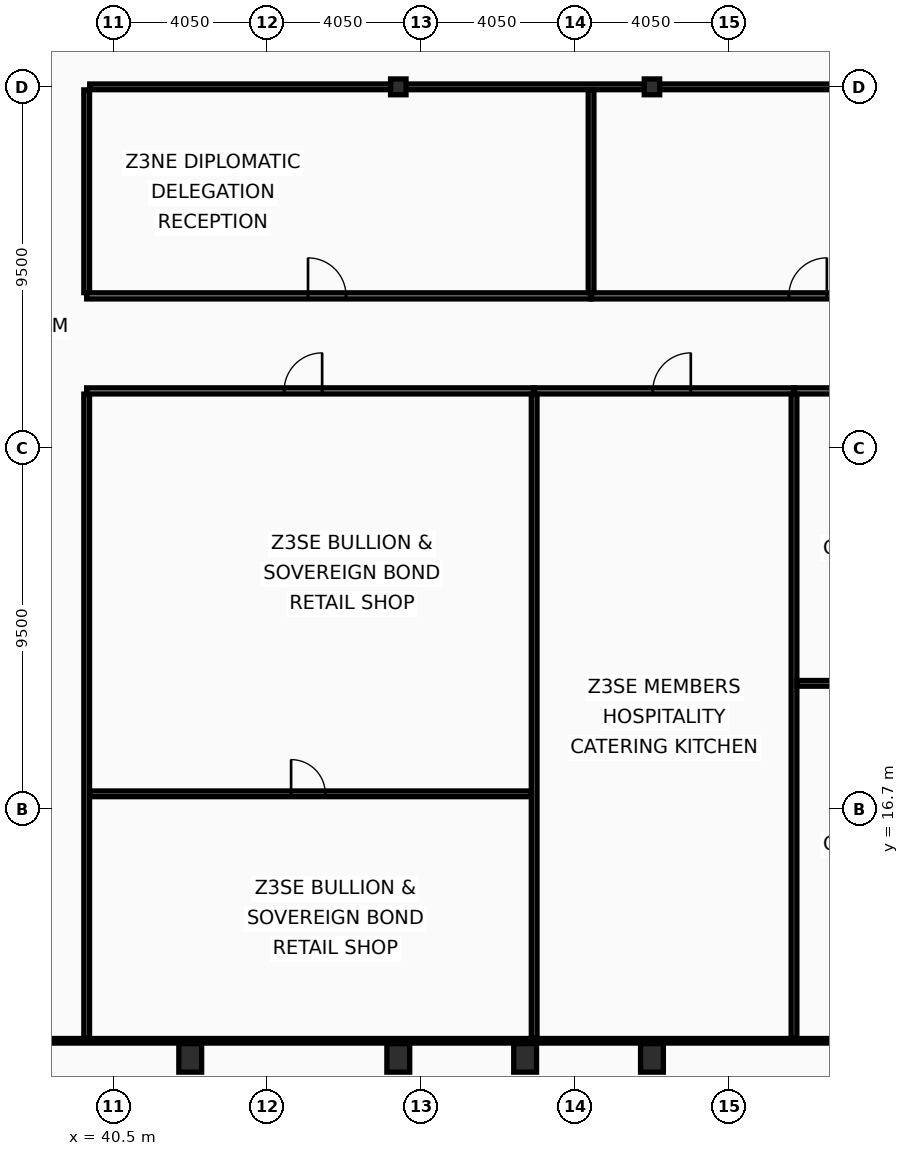
"""IFC4 building model, lengths in metres.
Left out: names, types, materials, properties, quantities, classifications, styles, units other than length and angle.
Written with IfcOpenShell. Run it as: python <this file> out.ifc"""

import sys

from ifc_helpers import new_model, si_unit, direction, frame, frame_2d, origin, origin_2d, place, context, subcontext, project, spatial, rectangle, hollow_rectangle, i_section, extrude, element, fill, save


model = new_model("IFC4")
c1 = context("Model", 3, precision=1e-05, world=origin(), true_north=direction((0.0, 1.0)))
c2 = subcontext(c1, "Body", "Model", "MODEL_VIEW")
j1 = project(units=[si_unit("LENGTHUNIT", "METRE"), si_unit("PLANEANGLEUNIT", "RADIAN")], contexts=[c1])
p1 = place(None, origin())
s1 = spatial("IfcSite", under=j1, at=p1, CompositionType="ELEMENT")
p2 = place(p1, origin())
s2 = spatial("IfcBuilding", under=s1, at=p2, CompositionType="ELEMENT")
p3 = place(p2, frame((0.0, 0.0, 210.2)))
s3 = spatial("IfcBuildingStorey", under=s2, at=p3, CompositionType="ELEMENT", Elevation=210.2)
for number, where, z_axis, x_axis in (
    (1, (42.525, 10.15, 0.0), (0.0, 0.0, 1.0), (1.0, 0.0, 0.0)),
    (2, (48.0, 10.15, 0.0), (0.0, 0.0, 1.0), (1.0, 0.0, 0.0)),
    (3, (51.337, 10.15, 0.0), (0.0, 0.0, 1.0), (1.0, 0.0, 0.0)),
    (4, (54.675, 10.15, 0.0), (0.0, 0.0, 1.0), (1.0, 0.0, 0.0)),
):
    element("IfcColumn", number, at=place(p3, frame(where, z_axis=z_axis, x_axis=x_axis)), inside=s3, PredefinedType="COLUMN", context=c2, shape_type="SweptSolid", body=[
        extrude(hollow_rectangle(XDim=0.6, YDim=0.75, WallThickness=0.045, at=origin_2d()), origin(), (0.0, 0.0, 1.0), 3.6),
    ])
for number, where, z_axis, x_axis in (
    (5, (48.0, 35.7, 0.0), (0.0, 0.0, 1.0), (1.0, 0.0, 0.0)),
    (6, (54.675, 35.7, 0.0), (0.0, 0.0, 1.0), (1.0, 0.0, 0.0)),
):
    element("IfcColumn", number, at=place(p3, frame(where, z_axis=z_axis, x_axis=x_axis)), inside=s3, PredefinedType="COLUMN", context=c2, shape_type="SweptSolid", body=[
        extrude(i_section(OverallWidth=0.406, OverallDepth=0.416, WebThickness=0.03, FlangeThickness=0.048, at=origin_2d()), origin(), (0.0, 0.0, 1.0), 3.6),
    ])
p4 = place(p3, frame((39.8, 10.665, 0.0), z_axis=(0.0, 0.0, 1.0), x_axis=(0.0, 1.0, 0.0)))
e7 = element("IfcWall", 7, at=p4, inside=s3, PredefinedType="PARTITIONING", context=c2, shape_type="SweptSolid", body=[
    extrude(rectangle(XDim=16.95, YDim=0.15, at=frame_2d((8.475, 0.0))), origin(), (0.0, 0.0, 1.0), 2.98),
])
p5 = place(p3, frame((39.8, 30.285, 0.0), z_axis=(0.0, 0.0, 1.0), x_axis=(0.0, 1.0, 0.0)))
e8 = element("IfcWall", 8, at=p5, inside=s3, PredefinedType="PARTITIONING", context=c2, shape_type="SweptSolid", body=[
    extrude(rectangle(XDim=5.335, YDim=0.15, at=frame_2d((2.667, 0.0))), origin(), (0.0, 0.0, 1.0), 2.98),
])
p6 = place(p3, frame((39.88, 35.7, 0.0), z_axis=(0.0, 0.0, 1.0), x_axis=(1.0, 0.0, 0.0)))
e9 = element("IfcWall", 9, at=p6, inside=s3, PredefinedType="PARTITIONING", context=c2, shape_type="SweptSolid", body=[
    extrude(rectangle(XDim=24.925, YDim=0.15, at=frame_2d((12.462, 0.0))), origin(), (0.0, 0.0, 1.0), 2.73),
])
p7 = place(p3, frame((39.8, 27.7, 0.0), z_axis=(0.0, 0.0, 1.0), x_axis=(1.0, 0.0, 0.0)))
e10 = element("IfcWall", 10, at=p7, inside=s3, PredefinedType="PARTITIONING", context=c2, shape_type="SweptSolid", body=[
    extrude(rectangle(XDim=11.775, YDim=0.16, at=frame_2d((5.888, 0.0))), origin(), (0.0, 0.0, 1.0), 2.73),
])
p8 = place(p7, frame((5.196, 0.0, 0.0)))
e11 = element("IfcOpeningElement", 11, at=p8, cuts=e10, PredefinedType="OPENING", context=c2, shape_type="SweptSolid", body=[
    extrude(rectangle(XDim=1.0, YDim=2.05, at=frame_2d((0.5, 1.025))), frame((0.0, 0.09, 0.0), z_axis=(0.0, -1.0, 0.0), x_axis=(1.0, 0.0, 0.0)), (0.0, 0.0, 1.0), 0.18),
])
p9 = place(p3, frame((39.88, 17.098, 0.0), z_axis=(0.0, 0.0, 1.0), x_axis=(1.0, 0.0, 0.0)))
e12 = element("IfcWall", 12, at=p9, inside=s3, PredefinedType="PARTITIONING", context=c2, shape_type="SweptSolid", body=[
    extrude(rectangle(XDim=11.615, YDim=0.15, at=frame_2d((5.808, 0.0))), origin(), (0.0, 0.0, 1.0), 2.73),
])
p10 = place(p9, frame((5.299, 0.0, 0.0)))
e13 = element("IfcOpeningElement", 13, at=p10, cuts=e12, PredefinedType="OPENING", context=c2, shape_type="SweptSolid", body=[
    extrude(rectangle(XDim=0.9, YDim=2.05, at=frame_2d((0.45, 1.025))), frame((0.0, 0.085, 0.0), z_axis=(0.0, -1.0, 0.0), x_axis=(1.0, 0.0, 0.0)), (0.0, 0.0, 1.0), 0.17),
])
p11 = place(p3, frame((51.575, 27.7, 0.0), z_axis=(0.0, 0.0, 1.0), x_axis=(1.0, 0.0, 0.0)))
e14 = element("IfcWall", 14, at=p11, inside=s3, PredefinedType="PARTITIONING", context=c2, shape_type="SweptSolid", body=[
    extrude(rectangle(XDim=6.837, YDim=0.16, at=frame_2d((3.419, 0.0))), origin(), (0.0, 0.0, 1.0), 2.73),
])
p12 = place(p11, frame((3.122, 0.0, 0.0)))
e15 = element("IfcOpeningElement", 15, at=p12, cuts=e14, PredefinedType="OPENING", context=c2, shape_type="SweptSolid", body=[
    extrude(rectangle(XDim=1.0, YDim=2.05, at=frame_2d((0.5, 1.025))), frame((0.0, 0.09, 0.0), z_axis=(0.0, -1.0, 0.0), x_axis=(1.0, 0.0, 0.0)), (0.0, 0.0, 1.0), 0.18),
])
p13 = place(p3, frame((51.575, 10.665, 0.0), z_axis=(0.0, 0.0, 1.0), x_axis=(0.0, 1.0, 0.0)))
e16 = element("IfcWall", 16, at=p13, inside=s3, PredefinedType="PARTITIONING", context=c2, shape_type="SweptSolid", body=[
    extrude(rectangle(XDim=16.95, YDim=0.15, at=frame_2d((8.475, 0.0))), origin(), (0.0, 0.0, 1.0), 2.98),
])
p14 = place(p3, frame((58.413, 27.7, 0.0), z_axis=(0.0, 0.0, 1.0), x_axis=(1.0, 0.0, 0.0)))
e17 = element("IfcWall", 17, at=p14, inside=s3, PredefinedType="PARTITIONING", context=c2, shape_type="SweptSolid", body=[
    extrude(rectangle(XDim=6.458, YDim=0.16, at=frame_2d((3.229, 0.0))), origin(), (0.0, 0.0, 1.0), 3.44),
])
p15 = place(p14, frame((2.962, 0.0, 0.0)))
e18 = element("IfcOpeningElement", 18, at=p15, cuts=e17, PredefinedType="OPENING", context=c2, shape_type="SweptSolid", body=[
    extrude(rectangle(XDim=1.0, YDim=2.05, at=frame_2d((0.5, 1.025))), frame((0.0, 0.09, 0.0), z_axis=(0.0, -1.0, 0.0), x_axis=(1.0, 0.0, 0.0)), (0.0, 0.0, 1.0), 0.18),
])
p16 = place(p3, frame((58.413, 10.665, 0.0), z_axis=(0.0, 0.0, 1.0), x_axis=(0.0, 1.0, 0.0)))
e19 = element("IfcWall", 19, at=p16, inside=s3, PredefinedType="PARTITIONING", context=c2, shape_type="SweptSolid", body=[
    extrude(rectangle(XDim=16.95, YDim=0.15, at=frame_2d((8.475, 0.0))), origin(), (0.0, 0.0, 1.0), 2.73),
])
p17 = place(p3, frame((58.493, 20.005, 0.0), z_axis=(0.0, 0.0, 1.0), x_axis=(1.0, 0.0, 0.0)))
e20 = element("IfcWall", 20, at=p17, inside=s3, PredefinedType="PARTITIONING", context=c2, shape_type="SweptSolid", body=[
    extrude(rectangle(XDim=6.312, YDim=0.15, at=frame_2d((3.156, 0.0))), origin(), (0.0, 0.0, 1.0), 3.44),
])
p18 = place(p17, frame((2.906, 0.0, 0.0)))
e21 = element("IfcOpeningElement", 21, at=p18, cuts=e20, PredefinedType="OPENING", context=c2, shape_type="SweptSolid", body=[
    extrude(rectangle(XDim=0.9, YDim=2.05, at=frame_2d((0.45, 1.025))), frame((0.0, 0.085, 0.0), z_axis=(0.0, -1.0, 0.0), x_axis=(1.0, 0.0, 0.0)), (0.0, 0.0, 1.0), 0.17),
])
p19 = place(p3, frame((39.8, 30.2, 0.0), z_axis=(0.0, 0.0, 1.0), x_axis=(1.0, 0.0, 0.0)))
e22 = element("IfcWall", 22, at=p19, inside=s3, PredefinedType="PARTITIONING", context=c2, shape_type="SweptSolid", body=[
    extrude(rectangle(XDim=13.272, YDim=0.16, at=frame_2d((6.636, 0.0))), origin(), (0.0, 0.0, 1.0), 2.73),
])
p20 = place(p19, frame((5.824, 0.0, 0.0)))
e23 = element("IfcOpeningElement", 23, at=p20, cuts=e22, PredefinedType="OPENING", context=c2, shape_type="SweptSolid", body=[
    extrude(rectangle(XDim=1.0, YDim=2.05, at=frame_2d((0.5, 1.025))), frame((0.0, 0.09, 0.0), z_axis=(0.0, -1.0, 0.0), x_axis=(1.0, 0.0, 0.0)), (0.0, 0.0, 1.0), 0.18),
])
p21 = place(p3, frame((53.073, 30.2, 0.0), z_axis=(0.0, 0.0, 1.0), x_axis=(1.0, 0.0, 0.0)))
e24 = element("IfcWall", 24, at=p21, inside=s3, PredefinedType="PARTITIONING", context=c2, shape_type="SweptSolid", body=[
    extrude(rectangle(XDim=11.798, YDim=0.16, at=frame_2d((5.899, 0.0))), origin(), (0.0, 0.0, 1.0), 2.73),
])
p22 = place(p21, frame((5.205, 0.0, 0.0)))
e25 = element("IfcOpeningElement", 25, at=p22, cuts=e24, PredefinedType="OPENING", context=c2, shape_type="SweptSolid", body=[
    extrude(rectangle(XDim=1.0, YDim=2.05, at=frame_2d((0.5, 1.025))), frame((0.0, 0.09, 0.0), z_axis=(0.0, -1.0, 0.0), x_axis=(1.0, 0.0, 0.0)), (0.0, 0.0, 1.0), 0.18),
])
p23 = place(p3, frame((53.073, 30.285, 0.0), z_axis=(0.0, 0.0, 1.0), x_axis=(0.0, 1.0, 0.0)))
e26 = element("IfcWall", 26, at=p23, inside=s3, PredefinedType="PARTITIONING", context=c2, shape_type="SweptSolid", body=[
    extrude(rectangle(XDim=5.335, YDim=0.15, at=frame_2d((2.667, 0.0))), origin(), (0.0, 0.0, 1.0), 2.98),
])
p24 = place(p3, frame((8.095, 10.6, 0.0), z_axis=(0.0, 0.0, 1.0), x_axis=(1.0, 0.0, 0.0)))
e27 = element("IfcWall", 27, at=p24, inside=s3, PredefinedType="PARTITIONING", context=c2, shape_type="SweptSolid", body=[
    extrude(rectangle(XDim=56.71, YDim=0.12, at=frame_2d((28.355, 0.0))), origin(), (0.0, 0.0, 1.0), 2.73),
])
p25 = place(p8, origin())
e28 = element("IfcDoor", 28, at=p25, inside=s3, OperationType="SINGLE_SWING_RIGHT", PredefinedType="DOOR", context=c2, shape_type="SweptSolid", body=[
    extrude(rectangle(XDim=1.0, YDim=2.05, at=frame_2d((0.5, 1.025))), frame((0.0, 0.025, 0.0), z_axis=(0.0, -1.0, 0.0), x_axis=(1.0, 0.0, 0.0)), (0.0, 0.0, 1.0), 0.05),
])
fill(e11, e28)
p26 = place(p10, origin())
e29 = element("IfcDoor", 29, at=p26, inside=s3, OperationType="SINGLE_SWING_LEFT", PredefinedType="DOOR", context=c2, shape_type="SweptSolid", body=[
    extrude(rectangle(XDim=0.9, YDim=2.05, at=frame_2d((0.45, 1.025))), frame((0.0, 0.025, 0.0), z_axis=(0.0, -1.0, 0.0), x_axis=(1.0, 0.0, 0.0)), (0.0, 0.0, 1.0), 0.05),
])
fill(e13, e29)
p27 = place(p12, origin())
e30 = element("IfcDoor", 30, at=p27, inside=s3, OperationType="SINGLE_SWING_RIGHT", PredefinedType="DOOR", context=c2, shape_type="SweptSolid", body=[
    extrude(rectangle(XDim=1.0, YDim=2.05, at=frame_2d((0.5, 1.025))), frame((0.0, 0.025, 0.0), z_axis=(0.0, -1.0, 0.0), x_axis=(1.0, 0.0, 0.0)), (0.0, 0.0, 1.0), 0.05),
])
fill(e15, e30)
p28 = place(p20, origin())
e31 = element("IfcDoor", 31, at=p28, inside=s3, OperationType="SINGLE_SWING_LEFT", PredefinedType="DOOR", context=c2, shape_type="SweptSolid", body=[
    extrude(rectangle(XDim=1.0, YDim=2.05, at=frame_2d((0.5, 1.025))), frame((0.0, 0.025, 0.0), z_axis=(0.0, -1.0, 0.0), x_axis=(1.0, 0.0, 0.0)), (0.0, 0.0, 1.0), 0.05),
])
fill(e23, e31)
p29 = place(p22, origin())
e32 = element("IfcDoor", 32, at=p29, inside=s3, OperationType="SINGLE_SWING_RIGHT", PredefinedType="DOOR", context=c2, shape_type="SweptSolid", body=[
    extrude(rectangle(XDim=1.0, YDim=2.05, at=frame_2d((0.5, 1.025))), frame((0.0, 0.025, 0.0), z_axis=(0.0, -1.0, 0.0), x_axis=(1.0, 0.0, 0.0)), (0.0, 0.0, 1.0), 0.05),
])
fill(e25, e32)
save(model, sys.argv[1])
